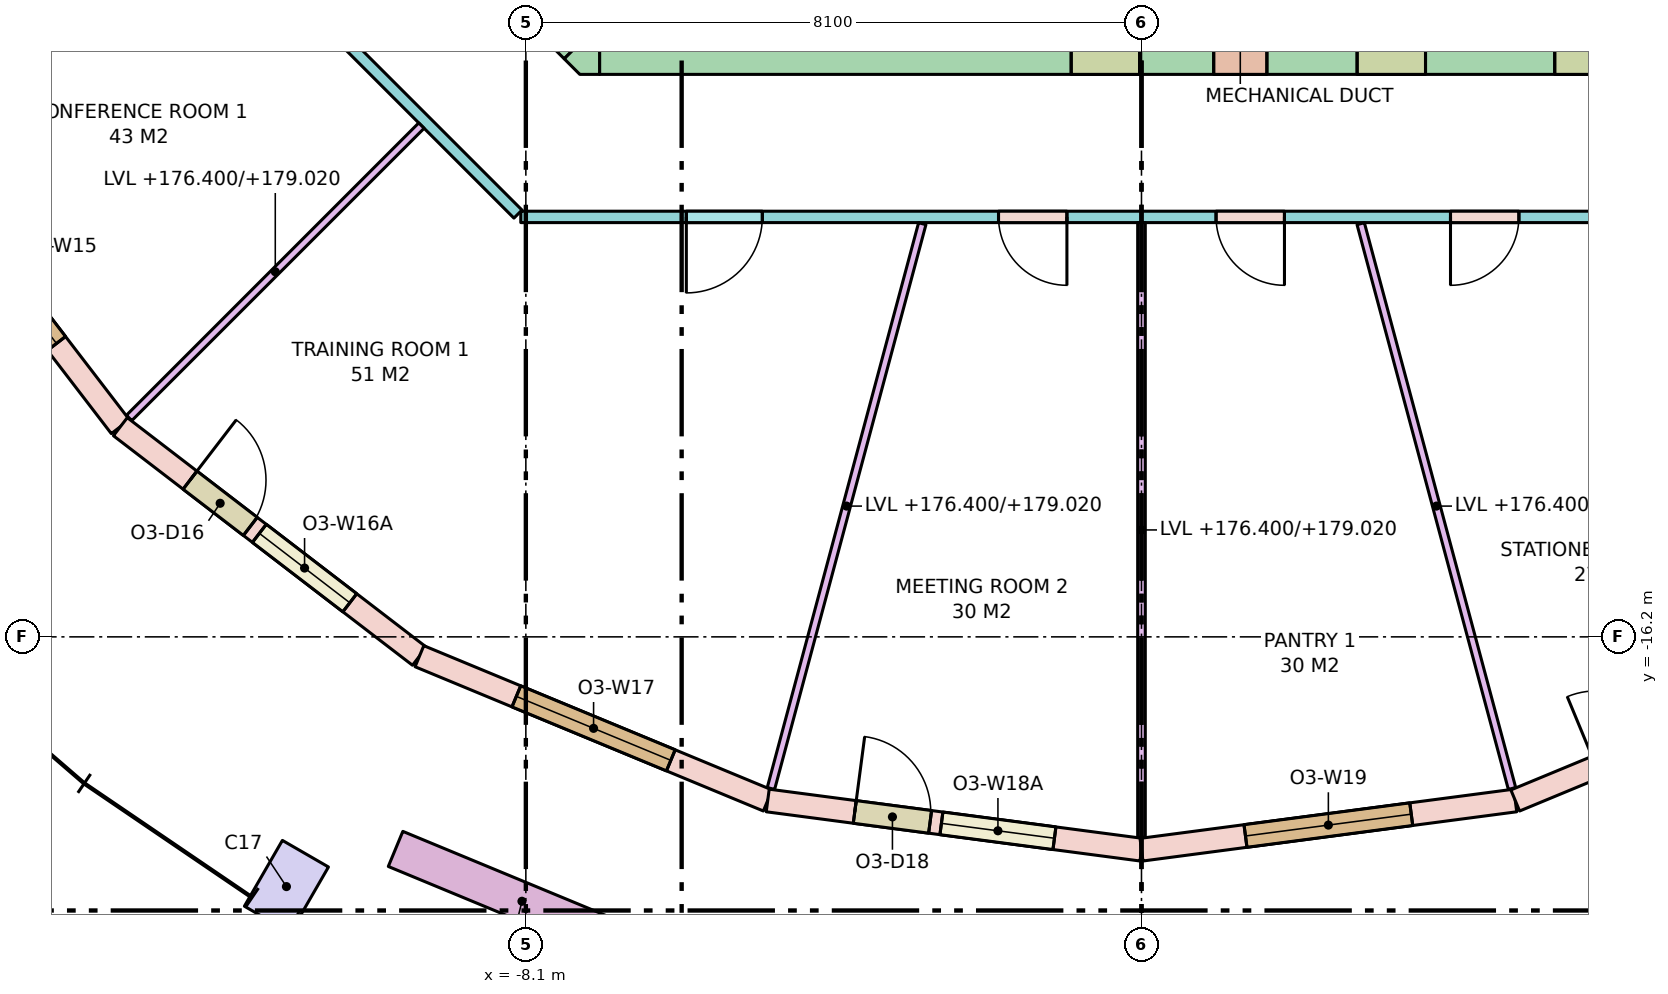
"""IFC4 building model, lengths in metres.
Left out: names, types, materials, properties, quantities, classifications, styles, units other than length and angle.
Written with IfcOpenShell. Run it as: python <this file> out.ifc"""

import sys

from ifc_helpers import new_model, si_unit, direction, frame, frame_2d, origin, origin_2d, place, context, subcontext, project, spatial, polyline, rectangle, outline, extrude, element, fill, save


model = new_model("IFC4")
c1 = context("Model", 3, precision=1e-05, world=origin(), true_north=direction((0.0, 1.0)))
c2 = subcontext(c1, "Body", "Model", "MODEL_VIEW")
j1 = project(units=[si_unit("LENGTHUNIT", "METRE"), si_unit("PLANEANGLEUNIT", "RADIAN")], contexts=[c1])
p1 = place(None, origin())
s1 = spatial("IfcSite", under=j1, at=p1, CompositionType="ELEMENT")
p2 = place(p1, origin())
s2 = spatial("IfcBuilding", under=s1, at=p2, CompositionType="ELEMENT")
p3 = place(p2, frame((0.0, 0.0, 176.4)))
s3 = spatial("IfcBuildingStorey", under=s2, at=p3, CompositionType="ELEMENT", Elevation=176.4)
p4 = place(p3, frame((-11.25, -19.486, 0.0), z_axis=(0.0, 0.0, 1.0), x_axis=(0.866025403784, -0.5, 0.0)))
e1 = element("IfcColumn", 1, at=p4, inside=s3, PredefinedType="COLUMN", context=c2, shape_type="SweptSolid", body=[
    extrude(rectangle(XDim=0.7, YDim=1.0, at=origin_2d()), origin(), (0.0, 0.0, 1.0), 3.7),
])
p5 = place(p3, frame((-7.13, -8.45, -0.28), z_axis=(0.0, 0.0, 1.0), x_axis=(1.0, 0.0, 0.0)))
e2 = element("IfcWall", 2, at=p5, inside=s3, PredefinedType="SHEAR", context=c2, shape_type="SweptSolid", body=[
    extrude(rectangle(XDim=14.26, YDim=0.7, at=frame_2d((7.13, 0.0))), origin(), (0.0, 0.0, 1.0), 3.7),
])
p6 = place(p5, frame((8.08, 0.0, 0.28)))
e3 = element("IfcOpeningElement", 3, at=p6, cuts=e2, PredefinedType="OPENING", context=c2, shape_type="SweptSolid", body=[
    extrude(rectangle(XDim=0.7, YDim=2.1, at=frame_2d((0.35, 1.05))), frame((0.0, 0.36, 0.0), z_axis=(0.0, -1.0, 0.0), x_axis=(1.0, 0.0, 0.0)), (0.0, 0.0, 1.0), 0.72),
])
p7 = place(p5, frame((6.205, 0.0, 0.28)))
e4 = element("IfcOpeningElement", 4, at=p7, cuts=e2, PredefinedType="OPENING", context=c2, shape_type="SweptSolid", body=[
    extrude(rectangle(XDim=0.9, YDim=2.1, at=frame_2d((0.45, 1.05))), frame((0.0, 0.36, 0.0), z_axis=(0.0, -1.0, 0.0), x_axis=(1.0, 0.0, 0.0)), (0.0, 0.0, 1.0), 0.72),
])
p8 = place(p5, frame((9.967, 0.0, 0.28)))
e5 = element("IfcOpeningElement", 5, at=p8, cuts=e2, PredefinedType="OPENING", context=c2, shape_type="SweptSolid", body=[
    extrude(rectangle(XDim=0.9, YDim=2.1, at=frame_2d((0.45, 1.05))), frame((0.0, 0.36, 0.0), z_axis=(0.0, -1.0, 0.0), x_axis=(1.0, 0.0, 0.0)), (0.0, 0.0, 1.0), 0.72),
])
p9 = place(p5, frame((12.567, 0.0, 0.28)))
e6 = element("IfcOpeningElement", 6, at=p9, cuts=e2, PredefinedType="OPENING", context=c2, shape_type="SweptSolid", body=[
    extrude(rectangle(XDim=0.9, YDim=2.1, at=frame_2d((0.45, 1.05))), frame((0.0, 0.36, 0.0), z_axis=(0.0, -1.0, 0.0), x_axis=(1.0, 0.0, 0.0)), (0.0, 0.0, 1.0), 0.72),
])
p10 = place(p3, frame((-7.347, -8.347, -0.28), z_axis=(0.0, 0.0, 1.0), x_axis=(-0.707106781187, 0.707106781187, 0.0)))
e7 = element("IfcWall", 7, at=p10, inside=s3, PredefinedType="SHEAR", context=c2, shape_type="SweptSolid", body=[
    extrude(rectangle(XDim=4.243, YDim=0.7, at=frame_2d((2.121, 0.0))), origin(), (0.0, 0.0, 1.0), 3.7),
])
p11 = place(p10, frame((2.393, 0.0, 0.28)))
e8 = element("IfcOpeningElement", 8, at=p11, cuts=e7, PredefinedType="OPENING", context=c2, shape_type="SweptSolid", body=[
    extrude(rectangle(XDim=1.2, YDim=2.1, at=frame_2d((0.6, 1.05))), frame((0.0, 0.36, 0.0), z_axis=(0.0, -1.0, 0.0), x_axis=(1.0, 0.0, 0.0)), (0.0, 0.0, 1.0), 0.72),
])
p12 = place(p3, frame((0.0, 0.0, -0.28)))
e9 = element("IfcWall", 9, at=p12, inside=s3, PredefinedType="SHEAR", context=c2, shape_type="SweptSolid", body=[
    extrude(outline(polyline([(-7.39, -8.8), (-7.595, -8.595), (-7.595, -8.595), (-7.595, -8.595), (-7.13, -8.13), (-7.13, -8.8), (-7.13, -8.8), (-7.39, -8.8)])), origin(), (0.0, 0.0, 1.0), 3.7),
])
p13 = place(p3, frame((-16.455, -9.5, 0.0), z_axis=(0.0, 0.0, 1.0), x_axis=(0.608768356425, -0.793348024649, 0.0)))
e10 = element("IfcWall", 10, at=p13, inside=s3, PredefinedType="STANDARD", context=c2, shape_type="SweptSolid", body=[
    extrude(rectangle(XDim=4.96, YDim=0.3, at=frame_2d((2.48, 0.0))), origin(), (0.0, 0.0, 1.0), 3.42),
])
p14 = place(p13, frame((1.38, 0.0, 0.8)))
e11 = element("IfcOpeningElement", 11, at=p14, cuts=e10, PredefinedType="OPENING", context=c2, shape_type="SweptSolid", body=[
    extrude(rectangle(XDim=2.2, YDim=2.4, at=frame_2d((1.1, 1.2))), frame((0.0, 0.16, 0.0), z_axis=(0.0, -1.0, 0.0), x_axis=(1.0, 0.0, 0.0)), (0.0, 0.0, 1.0), 0.32),
])
p15 = place(p3, frame((-13.435, -13.435, 0.0), z_axis=(0.0, 0.0, 1.0), x_axis=(0.793348024649, -0.608768356425, 0.0)))
e12 = element("IfcWall", 12, at=p15, inside=s3, PredefinedType="STANDARD", context=c2, shape_type="SweptSolid", body=[
    extrude(rectangle(XDim=4.96, YDim=0.3, at=frame_2d((2.48, 0.0))), origin(), (0.0, 0.0, 1.0), 3.42),
])
p16 = place(p15, frame((1.155, 0.0, 0.0)))
e13 = element("IfcOpeningElement", 13, at=p16, cuts=e12, PredefinedType="OPENING", context=c2, shape_type="SweptSolid", body=[
    extrude(rectangle(XDim=1.0, YDim=2.4, at=frame_2d((0.5, 1.2))), frame((0.0, 0.16, 0.0), z_axis=(0.0, -1.0, 0.0), x_axis=(1.0, 0.0, 0.0)), (0.0, 0.0, 1.0), 0.32),
])
p17 = place(p15, frame((2.305, 0.0, 0.8)))
e14 = element("IfcOpeningElement", 14, at=p17, cuts=e12, PredefinedType="OPENING", context=c2, shape_type="SweptSolid", body=[
    extrude(rectangle(XDim=1.5, YDim=2.4, at=frame_2d((0.75, 1.2))), frame((0.0, 0.16, 0.0), z_axis=(0.0, -1.0, 0.0), x_axis=(1.0, 0.0, 0.0)), (0.0, 0.0, 1.0), 0.32),
])
p18 = place(p3, frame((-9.5, -16.455, 0.0), z_axis=(0.0, 0.0, 1.0), x_axis=(0.923893254961, -0.382650301762, 0.0)))
e15 = element("IfcWall", 15, at=p18, inside=s3, PredefinedType="STANDARD", context=c2, shape_type="SweptSolid", body=[
    extrude(rectangle(XDim=4.96, YDim=0.3, at=frame_2d((2.48, 0.0))), origin(), (0.0, 0.0, 1.0), 3.42),
])
p19 = place(p18, frame((1.38, 0.0, 0.8)))
e16 = element("IfcOpeningElement", 16, at=p19, cuts=e15, PredefinedType="OPENING", context=c2, shape_type="SweptSolid", body=[
    extrude(rectangle(XDim=2.2, YDim=2.4, at=frame_2d((1.1, 1.2))), frame((0.0, 0.16, 0.0), z_axis=(0.0, -1.0, 0.0), x_axis=(1.0, 0.0, 0.0)), (0.0, 0.0, 1.0), 0.32),
])
p20 = place(p3, frame((-4.917, -18.353, 0.0), z_axis=(0.0, 0.0, 1.0), x_axis=(0.991443234469, -0.130538549191, 0.0)))
e17 = element("IfcWall", 17, at=p20, inside=s3, PredefinedType="STANDARD", context=c2, shape_type="SweptSolid", body=[
    extrude(rectangle(XDim=4.96, YDim=0.3, at=frame_2d((2.48, 0.0))), origin(), (0.0, 0.0, 1.0), 3.42),
])
p21 = place(p20, frame((1.155, 0.0, 0.0)))
e18 = element("IfcOpeningElement", 18, at=p21, cuts=e17, PredefinedType="OPENING", context=c2, shape_type="SweptSolid", body=[
    extrude(rectangle(XDim=1.0, YDim=2.4, at=frame_2d((0.5, 1.2))), frame((0.0, 0.16, 0.0), z_axis=(0.0, -1.0, 0.0), x_axis=(1.0, 0.0, 0.0)), (0.0, 0.0, 1.0), 0.32),
])
p22 = place(p20, frame((2.305, 0.0, 0.8)))
e19 = element("IfcOpeningElement", 19, at=p22, cuts=e17, PredefinedType="OPENING", context=c2, shape_type="SweptSolid", body=[
    extrude(rectangle(XDim=1.5, YDim=2.4, at=frame_2d((0.75, 1.2))), frame((0.0, 0.16, 0.0), z_axis=(0.0, -1.0, 0.0), x_axis=(1.0, 0.0, 0.0)), (0.0, 0.0, 1.0), 0.32),
])
p23 = place(p3, frame((0.0, -19.0, 0.0), z_axis=(0.0, 0.0, 1.0), x_axis=(0.991443234469, 0.130538549191, 0.0)))
e20 = element("IfcWall", 20, at=p23, inside=s3, PredefinedType="STANDARD", context=c2, shape_type="SweptSolid", body=[
    extrude(rectangle(XDim=4.96, YDim=0.3, at=frame_2d((2.48, 0.0))), origin(), (0.0, 0.0, 1.0), 3.42),
])
p24 = place(p23, frame((1.38, 0.0, 0.8)))
e21 = element("IfcOpeningElement", 21, at=p24, cuts=e20, PredefinedType="OPENING", context=c2, shape_type="SweptSolid", body=[
    extrude(rectangle(XDim=2.2, YDim=2.4, at=frame_2d((1.1, 1.2))), frame((0.0, 0.16, 0.0), z_axis=(0.0, -1.0, 0.0), x_axis=(1.0, 0.0, 0.0)), (0.0, 0.0, 1.0), 0.32),
])
p25 = place(p3, frame((4.917, -18.353, 0.0), z_axis=(0.0, 0.0, 1.0), x_axis=(0.923893254961, 0.382650301762, 0.0)))
e22 = element("IfcWall", 22, at=p25, inside=s3, PredefinedType="STANDARD", context=c2, shape_type="SweptSolid", body=[
    extrude(rectangle(XDim=4.96, YDim=0.3, at=frame_2d((2.48, 0.0))), origin(), (0.0, 0.0, 1.0), 3.42),
])
p26 = place(p25, frame((1.155, 0.0, 0.0)))
e23 = element("IfcOpeningElement", 23, at=p26, cuts=e22, PredefinedType="OPENING", context=c2, shape_type="SweptSolid", body=[
    extrude(rectangle(XDim=1.0, YDim=2.4, at=frame_2d((0.5, 1.2))), frame((0.0, 0.16, 0.0), z_axis=(0.0, -1.0, 0.0), x_axis=(1.0, 0.0, 0.0)), (0.0, 0.0, 1.0), 0.32),
])
p27 = place(p25, frame((2.305, 0.0, 0.8)))
e24 = element("IfcOpeningElement", 24, at=p27, cuts=e22, PredefinedType="OPENING", context=c2, shape_type="SweptSolid", body=[
    extrude(rectangle(XDim=1.5, YDim=2.4, at=frame_2d((0.75, 1.2))), frame((0.0, 0.16, 0.0), z_axis=(0.0, -1.0, 0.0), x_axis=(1.0, 0.0, 0.0)), (0.0, 0.0, 1.0), 0.32),
])
p28 = place(p3, frame((-9.814, -18.99, 0.0), z_axis=(0.0, 0.0, 1.0), x_axis=(0.923875488976, -0.382693194178, 0.0)))
e25 = element("IfcWall", 25, at=p28, inside=s3, PredefinedType="PARAPET", context=c2, shape_type="SweptSolid", body=[
    extrude(rectangle(XDim=3.6, YDim=0.5, at=frame_2d((1.8, 0.0))), origin(), (0.0, 0.0, 1.0), 0.9),
])
p29 = place(p3, frame((8.167, -10.675, 0.0), z_axis=(0.0, 0.0, 1.0), x_axis=(-1.0, 0.0, 0.0)))
e26 = element("IfcWall", 26, at=p29, inside=s3, PredefinedType="PARTITIONING", context=c2, shape_type="SweptSolid", body=[
    extrude(rectangle(XDim=16.333, YDim=0.15, at=frame_2d((8.167, 0.0))), origin(), (0.0, 0.0, 1.0), 2.62),
])
p30 = place(p29, frame((13.155, 0.0, 0.0)))
e27 = element("IfcOpeningElement", 27, at=p30, cuts=e26, PredefinedType="OPENING", context=c2, shape_type="SweptSolid", body=[
    extrude(rectangle(XDim=1.0, YDim=2.1, at=frame_2d((0.5, 1.05))), frame((0.0, 0.085, 0.0), z_axis=(0.0, -1.0, 0.0), x_axis=(1.0, 0.0, 0.0)), (0.0, 0.0, 1.0), 0.17),
])
p31 = place(p29, frame((9.148, 0.0, 0.0)))
e28 = element("IfcOpeningElement", 28, at=p31, cuts=e26, PredefinedType="OPENING", context=c2, shape_type="SweptSolid", body=[
    extrude(rectangle(XDim=0.9, YDim=2.1, at=frame_2d((0.45, 1.05))), frame((0.0, 0.085, 0.0), z_axis=(0.0, -1.0, 0.0), x_axis=(1.0, 0.0, 0.0)), (0.0, 0.0, 1.0), 0.17),
])
p32 = place(p29, frame((6.285, 0.0, 0.0)))
e29 = element("IfcOpeningElement", 29, at=p32, cuts=e26, PredefinedType="OPENING", context=c2, shape_type="SweptSolid", body=[
    extrude(rectangle(XDim=0.9, YDim=2.1, at=frame_2d((0.45, 1.05))), frame((0.0, 0.085, 0.0), z_axis=(0.0, -1.0, 0.0), x_axis=(1.0, 0.0, 0.0)), (0.0, 0.0, 1.0), 0.17),
])
p33 = place(p29, frame((3.201, 0.0, 0.0)))
e30 = element("IfcOpeningElement", 30, at=p33, cuts=e26, PredefinedType="OPENING", context=c2, shape_type="SweptSolid", body=[
    extrude(rectangle(XDim=0.9, YDim=2.1, at=frame_2d((0.45, 1.05))), frame((0.0, 0.085, 0.0), z_axis=(0.0, -1.0, 0.0), x_axis=(1.0, 0.0, 0.0)), (0.0, 0.0, 1.0), 0.17),
])
p34 = place(p3, frame((-8.204, -10.638, 0.0), z_axis=(0.0, 0.0, 1.0), x_axis=(-0.707106781187, 0.707106781187, 0.0)))
e31 = element("IfcWall", 31, at=p34, inside=s3, PredefinedType="PARTITIONING", context=c2, shape_type="SweptSolid", body=[
    extrude(rectangle(XDim=6.271, YDim=0.15, at=frame_2d((3.135, 0.0))), origin(), (0.0, 0.0, 1.0), 2.62),
])
p35 = place(p34, frame((3.471, 0.0, 0.0)))
e32 = element("IfcOpeningElement", 32, at=p35, cuts=e31, PredefinedType="OPENING", context=c2, shape_type="SweptSolid", body=[
    extrude(rectangle(XDim=1.0, YDim=2.1, at=frame_2d((0.5, 1.05))), frame((0.0, 0.085, 0.0), z_axis=(0.0, -1.0, 0.0), x_axis=(1.0, 0.0, 0.0)), (0.0, 0.0, 1.0), 0.17),
])
p36 = place(p3, frame((-9.474, -9.474, 0.0), z_axis=(0.0, 0.0, 1.0), x_axis=(-0.707106781187, -0.707106781187, 0.0)))
e33 = element("IfcWall", 33, at=p36, inside=s3, PredefinedType="PARTITIONING", context=c2, shape_type="SweptSolid", body=[
    extrude(rectangle(XDim=5.439, YDim=0.1, at=frame_2d((2.719, 0.0))), origin(), (0.0, 0.0, 1.0), 2.62),
])
p37 = place(p3, frame((-2.884, -10.764, 0.0), z_axis=(0.0, 0.0, 1.0), x_axis=(-0.25881804804, -0.965926093451, 0.0)))
e34 = element("IfcWall", 34, at=p37, inside=s3, PredefinedType="PARTITIONING", context=c2, shape_type="SweptSolid", body=[
    extrude(rectangle(XDim=7.693, YDim=0.1, at=frame_2d((3.846, 0.0))), origin(), (0.0, 0.0, 1.0), 2.62),
])
p38 = place(p3, frame((0.0, -10.75, 0.0), z_axis=(0.0, 0.0, 1.0), x_axis=(0.0, -1.0, 0.0)))
e35 = element("IfcWall", 35, at=p38, inside=s3, PredefinedType="PARTITIONING", context=c2, shape_type="SweptSolid", body=[
    extrude(rectangle(XDim=8.087, YDim=0.1, at=frame_2d((4.043, 0.0))), origin(), (0.0, 0.0, 1.0), 2.62),
])
p39 = place(p3, frame((2.884, -10.764, 0.0), z_axis=(0.0, 0.0, 1.0), x_axis=(0.25881804804, -0.965926093451, 0.0)))
e36 = element("IfcWall", 36, at=p39, inside=s3, PredefinedType="PARTITIONING", context=c2, shape_type="SweptSolid", body=[
    extrude(rectangle(XDim=7.693, YDim=0.1, at=frame_2d((3.846, 0.0))), origin(), (0.0, 0.0, 1.0), 2.62),
])
p40 = place(p14, origin())
e37 = element("IfcWindow", 37, at=p40, inside=s3, PartitioningType="SINGLE_PANEL", PredefinedType="WINDOW", context=c2, shape_type="SweptSolid", body=[
    extrude(rectangle(XDim=2.2, YDim=2.4, at=frame_2d((1.1, 1.2))), frame((0.0, 0.03, 0.0), z_axis=(0.0, -1.0, 0.0), x_axis=(1.0, 0.0, 0.0)), (0.0, 0.0, 1.0), 0.06),
])
fill(e11, e37)
p41 = place(p16, origin())
e38 = element("IfcDoor", 38, at=p41, inside=s3, OperationType="SINGLE_SWING_LEFT", PredefinedType="DOOR", context=c2, shape_type="SweptSolid", body=[
    extrude(rectangle(XDim=1.0, YDim=2.4, at=frame_2d((0.5, 1.2))), frame((0.0, 0.025, 0.0), z_axis=(0.0, -1.0, 0.0), x_axis=(1.0, 0.0, 0.0)), (0.0, 0.0, 1.0), 0.05),
])
fill(e13, e38)
p42 = place(p17, origin())
e39 = element("IfcWindow", 39, at=p42, inside=s3, PartitioningType="SINGLE_PANEL", PredefinedType="WINDOW", context=c2, shape_type="SweptSolid", body=[
    extrude(rectangle(XDim=1.5, YDim=2.4, at=frame_2d((0.75, 1.2))), frame((0.0, 0.03, 0.0), z_axis=(0.0, -1.0, 0.0), x_axis=(1.0, 0.0, 0.0)), (0.0, 0.0, 1.0), 0.06),
])
fill(e14, e39)
p43 = place(p19, origin())
e40 = element("IfcWindow", 40, at=p43, inside=s3, PartitioningType="SINGLE_PANEL", PredefinedType="WINDOW", context=c2, shape_type="SweptSolid", body=[
    extrude(rectangle(XDim=2.2, YDim=2.4, at=frame_2d((1.1, 1.2))), frame((0.0, 0.03, 0.0), z_axis=(0.0, -1.0, 0.0), x_axis=(1.0, 0.0, 0.0)), (0.0, 0.0, 1.0), 0.06),
])
fill(e16, e40)
p44 = place(p21, origin())
e41 = element("IfcDoor", 41, at=p44, inside=s3, OperationType="SINGLE_SWING_LEFT", PredefinedType="DOOR", context=c2, shape_type="SweptSolid", body=[
    extrude(rectangle(XDim=1.0, YDim=2.4, at=frame_2d((0.5, 1.2))), frame((0.0, 0.025, 0.0), z_axis=(0.0, -1.0, 0.0), x_axis=(1.0, 0.0, 0.0)), (0.0, 0.0, 1.0), 0.05),
])
fill(e18, e41)
p45 = place(p22, origin())
e42 = element("IfcWindow", 42, at=p45, inside=s3, PartitioningType="SINGLE_PANEL", PredefinedType="WINDOW", context=c2, shape_type="SweptSolid", body=[
    extrude(rectangle(XDim=1.5, YDim=2.4, at=frame_2d((0.75, 1.2))), frame((0.0, 0.03, 0.0), z_axis=(0.0, -1.0, 0.0), x_axis=(1.0, 0.0, 0.0)), (0.0, 0.0, 1.0), 0.06),
])
fill(e19, e42)
p46 = place(p24, origin())
e43 = element("IfcWindow", 43, at=p46, inside=s3, PartitioningType="SINGLE_PANEL", PredefinedType="WINDOW", context=c2, shape_type="SweptSolid", body=[
    extrude(rectangle(XDim=2.2, YDim=2.4, at=frame_2d((1.1, 1.2))), frame((0.0, 0.03, 0.0), z_axis=(0.0, -1.0, 0.0), x_axis=(1.0, 0.0, 0.0)), (0.0, 0.0, 1.0), 0.06),
])
fill(e21, e43)
p47 = place(p30, origin())
e44 = element("IfcDoor", 44, at=p47, inside=s3, OperationType="SINGLE_SWING_RIGHT", PredefinedType="DOOR", context=c2, shape_type="SweptSolid", body=[
    extrude(rectangle(XDim=1.0, YDim=2.1, at=frame_2d((0.5, 1.05))), frame((0.0, 0.025, 0.0), z_axis=(0.0, -1.0, 0.0), x_axis=(1.0, 0.0, 0.0)), (0.0, 0.0, 1.0), 0.05),
])
fill(e27, e44)
p48 = place(p31, origin())
e45 = element("IfcDoor", 45, at=p48, inside=s3, OperationType="SINGLE_SWING_LEFT", PredefinedType="DOOR", context=c2, shape_type="SweptSolid", body=[
    extrude(rectangle(XDim=0.9, YDim=2.1, at=frame_2d((0.45, 1.05))), frame((0.0, 0.025, 0.0), z_axis=(0.0, -1.0, 0.0), x_axis=(1.0, 0.0, 0.0)), (0.0, 0.0, 1.0), 0.05),
])
fill(e28, e45)
p49 = place(p32, origin())
e46 = element("IfcDoor", 46, at=p49, inside=s3, OperationType="SINGLE_SWING_LEFT", PredefinedType="DOOR", context=c2, shape_type="SweptSolid", body=[
    extrude(rectangle(XDim=0.9, YDim=2.1, at=frame_2d((0.45, 1.05))), frame((0.0, 0.025, 0.0), z_axis=(0.0, -1.0, 0.0), x_axis=(1.0, 0.0, 0.0)), (0.0, 0.0, 1.0), 0.05),
])
fill(e29, e46)
p50 = place(p33, origin())
e47 = element("IfcDoor", 47, at=p50, inside=s3, OperationType="SINGLE_SWING_RIGHT", PredefinedType="DOOR", context=c2, shape_type="SweptSolid", body=[
    extrude(rectangle(XDim=0.9, YDim=2.1, at=frame_2d((0.45, 1.05))), frame((0.0, 0.025, 0.0), z_axis=(0.0, -1.0, 0.0), x_axis=(1.0, 0.0, 0.0)), (0.0, 0.0, 1.0), 0.05),
])
fill(e30, e47)
save(model, sys.argv[1])
